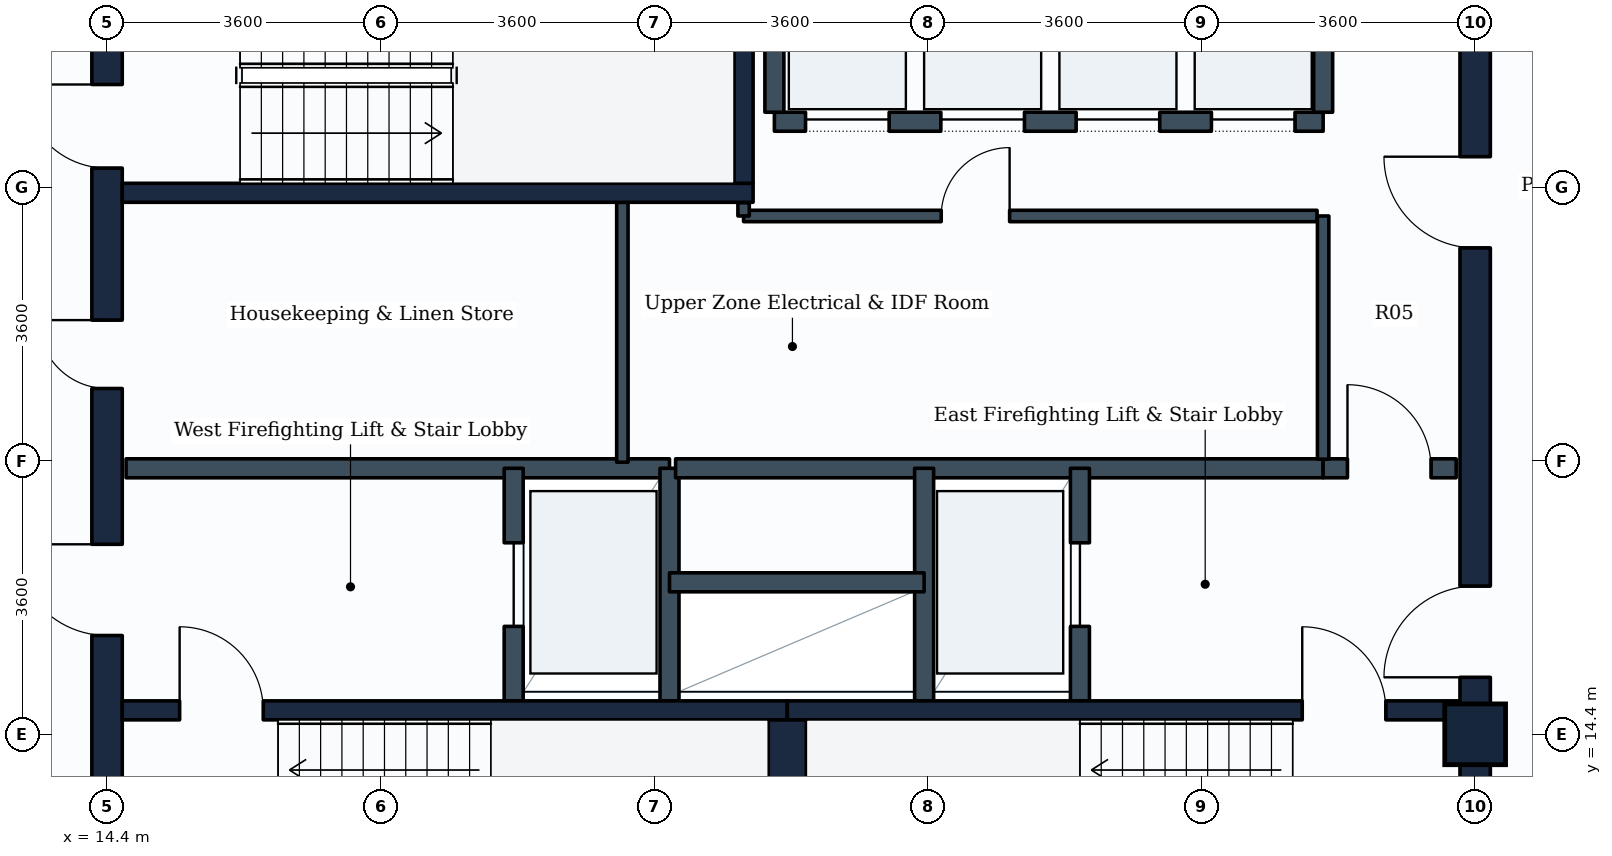
"""IFC4 building model, lengths in metres.
Left out: names, types, materials, properties, quantities, classifications, styles, units other than length and angle.
Written with IfcOpenShell. Run it as: python <this file> out.ifc"""

import sys

from ifc_helpers import new_model, si_unit, direction, frame, frame_2d, origin, origin_2d, place, context, subcontext, project, spatial, rectangle, extrude, element, fill, save


model = new_model("IFC4")
c1 = context("Model", 3, precision=1e-05, world=origin(), true_north=direction((0.0, 1.0)))
c2 = subcontext(c1, "Body", "Model", "MODEL_VIEW")
j1 = project(units=[si_unit("LENGTHUNIT", "METRE"), si_unit("PLANEANGLEUNIT", "RADIAN")], contexts=[c1])
p1 = place(None, origin())
s1 = spatial("IfcSite", under=j1, at=p1, CompositionType="ELEMENT")
p2 = place(p1, origin())
s2 = spatial("IfcBuilding", under=s1, at=p2, CompositionType="ELEMENT")
p3 = place(p2, frame((0.0, 0.0, 263.0)))
s3 = spatial("IfcBuildingStorey", under=s2, at=p3, CompositionType="ELEMENT", Elevation=263.0)
p4 = place(p3, frame((32.4, 14.4, 0.0), z_axis=(0.0, 0.0, 1.0), x_axis=(1.0, 0.0, 0.0)))
e1 = element("IfcColumn", 1, at=p4, inside=s3, PredefinedType="COLUMN", context=c2, shape_type="SweptSolid", body=[
    extrude(rectangle(XDim=0.8, YDim=0.8, at=origin_2d()), origin(), (0.0, 0.0, 1.0), 3.6),
])
p5 = place(p3, frame((14.4, 10.8, 0.0), z_axis=(0.0, 0.0, 1.0), x_axis=(0.0, 1.0, 0.0)))
e2 = element("IfcWall", 2, at=p5, inside=s3, PredefinedType="SHEAR", context=c2, shape_type="SweptSolid", body=[
    extrude(rectangle(XDim=14.4, YDim=0.4, at=frame_2d((7.2, 0.0))), origin(), (0.0, 0.0, 1.0), 3.35),
])
p6 = place(p5, frame((11.05, 0.0, 0.0)))
e3 = element("IfcOpeningElement", 3, at=p6, cuts=e2, PredefinedType="OPENING", context=c2, shape_type="SweptSolid", body=[
    extrude(rectangle(XDim=1.1, YDim=2.1, at=frame_2d((0.55, 1.05))), frame((0.0, 0.21, 0.0), z_axis=(0.0, -1.0, 0.0), x_axis=(1.0, 0.0, 0.0)), (0.0, 0.0, 1.0), 0.42),
])
p7 = place(p5, frame((4.9, 0.0, 0.0)))
e4 = element("IfcOpeningElement", 4, at=p7, cuts=e2, PredefinedType="OPENING", context=c2, shape_type="SweptSolid", body=[
    extrude(rectangle(XDim=1.2, YDim=2.1, at=frame_2d((0.6, 1.05))), frame((0.0, 0.21, 0.0), z_axis=(0.0, -1.0, 0.0), x_axis=(1.0, 0.0, 0.0)), (0.0, 0.0, 1.0), 0.42),
])
p8 = place(p5, frame((8.15, 0.0, 0.0)))
e5 = element("IfcOpeningElement", 5, at=p8, cuts=e2, PredefinedType="OPENING", context=c2, shape_type="SweptSolid", body=[
    extrude(rectangle(XDim=0.9, YDim=2.1, at=frame_2d((0.45, 1.05))), frame((0.0, 0.21, 0.0), z_axis=(0.0, -1.0, 0.0), x_axis=(1.0, 0.0, 0.0)), (0.0, 0.0, 1.0), 0.42),
])
p9 = place(p3, frame((32.4, 10.8, 0.0), z_axis=(0.0, 0.0, 1.0), x_axis=(0.0, 1.0, 0.0)))
e6 = element("IfcWall", 6, at=p9, inside=s3, PredefinedType="SHEAR", context=c2, shape_type="SweptSolid", body=[
    extrude(rectangle(XDim=14.4, YDim=0.4, at=frame_2d((7.2, 0.0))), origin(), (0.0, 0.0, 1.0), 3.35),
])
p10 = place(p9, frame((4.35, 0.0, 0.0)))
e7 = element("IfcOpeningElement", 7, at=p10, cuts=e6, PredefinedType="OPENING", context=c2, shape_type="SweptSolid", body=[
    extrude(rectangle(XDim=1.2, YDim=2.1, at=frame_2d((0.6, 1.05))), frame((0.0, 0.21, 0.0), z_axis=(0.0, -1.0, 0.0), x_axis=(1.0, 0.0, 0.0)), (0.0, 0.0, 1.0), 0.42),
])
p11 = place(p9, frame((10.0, 0.0, 0.0)))
e8 = element("IfcOpeningElement", 8, at=p11, cuts=e6, PredefinedType="OPENING", context=c2, shape_type="SweptSolid", body=[
    extrude(rectangle(XDim=1.2, YDim=2.1, at=frame_2d((0.6, 1.05))), frame((0.0, 0.21, 0.0), z_axis=(0.0, -1.0, 0.0), x_axis=(1.0, 0.0, 0.0)), (0.0, 0.0, 1.0), 0.42),
])
p12 = place(p3, frame((14.6, 14.715, 0.0), z_axis=(0.0, 0.0, 1.0), x_axis=(1.0, 0.0, 0.0)))
e9 = element("IfcWall", 9, at=p12, inside=s3, PredefinedType="SHEAR", context=c2, shape_type="SweptSolid", body=[
    extrude(rectangle(XDim=8.75, YDim=0.25, at=frame_2d((4.375, 0.0))), origin(), (0.0, 0.0, 1.0), 3.35),
])
p13 = place(p12, frame((0.755, 0.0, 0.0)))
e10 = element("IfcOpeningElement", 10, at=p13, cuts=e9, PredefinedType="OPENING", context=c2, shape_type="SweptSolid", body=[
    extrude(rectangle(XDim=1.1, YDim=2.1, at=frame_2d((0.55, 1.05))), frame((0.0, 0.135, 0.0), z_axis=(0.0, -1.0, 0.0), x_axis=(1.0, 0.0, 0.0)), (0.0, 0.0, 1.0), 0.27),
])
p14 = place(p3, frame((23.35, 14.715, 0.0), z_axis=(0.0, 0.0, 1.0), x_axis=(1.0, 0.0, 0.0)))
e11 = element("IfcWall", 11, at=p14, inside=s3, PredefinedType="SHEAR", context=c2, shape_type="SweptSolid", body=[
    extrude(rectangle(XDim=8.85, YDim=0.25, at=frame_2d((4.425, 0.0))), origin(), (0.0, 0.0, 1.0), 3.35),
])
p15 = place(p14, frame((6.775, 0.0, 0.0)))
e12 = element("IfcOpeningElement", 12, at=p15, cuts=e11, PredefinedType="OPENING", context=c2, shape_type="SweptSolid", body=[
    extrude(rectangle(XDim=1.1, YDim=2.1, at=frame_2d((0.55, 1.05))), frame((0.0, 0.135, 0.0), z_axis=(0.0, -1.0, 0.0), x_axis=(1.0, 0.0, 0.0)), (0.0, 0.0, 1.0), 0.27),
])
p16 = place(p3, frame((23.35, 11.75, 0.0), z_axis=(0.0, 0.0, 1.0), x_axis=(0.0, 1.0, 0.0)))
e13 = element("IfcWall", 13, at=p16, inside=s3, PredefinedType="SHEAR", context=c2, shape_type="SweptSolid", body=[
    extrude(rectangle(XDim=2.84, YDim=0.5, at=frame_2d((1.42, 0.0))), origin(), (0.0, 0.0, 1.0), 3.35),
])
p17 = place(p3, frame((14.6, 21.525, 0.0), z_axis=(0.0, 0.0, 1.0), x_axis=(1.0, 0.0, 0.0)))
e14 = element("IfcWall", 14, at=p17, inside=s3, PredefinedType="SHEAR", context=c2, shape_type="SweptSolid", body=[
    extrude(rectangle(XDim=8.3, YDim=0.25, at=frame_2d((4.15, 0.0))), origin(), (0.0, 0.0, 1.0), 3.35),
])
p18 = place(p3, frame((22.775, 21.65, 0.0), z_axis=(0.0, 0.0, 1.0), x_axis=(0.0, 1.0, 0.0)))
e15 = element("IfcWall", 15, at=p18, inside=s3, PredefinedType="SHEAR", context=c2, shape_type="SweptSolid", body=[
    extrude(rectangle(XDim=2.84, YDim=0.25, at=frame_2d((1.42, 0.0))), origin(), (0.0, 0.0, 1.0), 3.35),
])
p19 = place(p3, frame((14.65, 17.9, 0.0), z_axis=(0.0, 0.0, 1.0), x_axis=(1.0, 0.0, 0.0)))
e16 = element("IfcWall", 16, at=p19, inside=s3, PredefinedType="PARTITIONING", context=c2, shape_type="SweptSolid", body=[
    extrude(rectangle(XDim=7.15, YDim=0.25, at=frame_2d((3.575, 0.0))), origin(), (0.0, 0.0, 1.0), 3.335),
])
p20 = place(p3, frame((19.75, 14.84, 0.0), z_axis=(0.0, 0.0, 1.0), x_axis=(0.0, 1.0, 0.0)))
e17 = element("IfcWall", 17, at=p20, inside=s3, PredefinedType="PARTITIONING", context=c2, shape_type="SweptSolid", body=[
    extrude(rectangle(XDim=3.06, YDim=0.25, at=frame_2d((1.53, 0.0))), origin(), (0.0, 0.0, 1.0), 3.335),
])
p21 = place(p20, frame((0.98, 0.0, 0.0)))
e18 = element("IfcOpeningElement", 18, at=p21, cuts=e17, PredefinedType="OPENING", context=c2, shape_type="SweptSolid", body=[
    extrude(rectangle(XDim=1.1, YDim=2.1, at=frame_2d((0.55, 1.05))), frame((0.0, 0.135, 0.0), z_axis=(0.0, -1.0, 0.0), x_axis=(1.0, 0.0, 0.0)), (0.0, 0.0, 1.0), 0.27),
])
p22 = place(p3, frame((21.8, 14.84, 0.0), z_axis=(0.0, 0.0, 1.0), x_axis=(0.0, 1.0, 0.0)))
e19 = element("IfcWall", 19, at=p22, inside=s3, PredefinedType="PARTITIONING", context=c2, shape_type="SweptSolid", body=[
    extrude(rectangle(XDim=3.06, YDim=0.25, at=frame_2d((1.53, 0.0))), origin(), (0.0, 0.0, 1.0), 3.335),
])
p23 = place(p3, frame((21.88, 17.9, 0.0), z_axis=(0.0, 0.0, 1.0), x_axis=(1.0, 0.0, 0.0)))
e20 = element("IfcWall", 20, at=p23, inside=s3, PredefinedType="PARTITIONING", context=c2, shape_type="SweptSolid", body=[
    extrude(rectangle(XDim=8.52, YDim=0.25, at=frame_2d((4.26, 0.0))), origin(), (0.0, 0.0, 1.0), 3.335),
])
p24 = place(p3, frame((30.4, 17.9, 0.0), z_axis=(0.0, 0.0, 1.0), x_axis=(1.0, 0.0, 0.0)))
e21 = element("IfcWall", 21, at=p24, inside=s3, PredefinedType="PARTITIONING", context=c2, shape_type="SweptSolid", body=[
    extrude(rectangle(XDim=1.75, YDim=0.25, at=frame_2d((0.875, 0.0))), origin(), (0.0, 0.0, 1.0), 3.335),
])
p25 = place(p24, frame((0.32, 0.0, 0.0)))
e22 = element("IfcOpeningElement", 22, at=p25, cuts=e21, PredefinedType="OPENING", context=c2, shape_type="SweptSolid", body=[
    extrude(rectangle(XDim=1.1, YDim=2.1, at=frame_2d((0.55, 1.05))), frame((0.0, 0.135, 0.0), z_axis=(0.0, -1.0, 0.0), x_axis=(1.0, 0.0, 0.0)), (0.0, 0.0, 1.0), 0.27),
])
p26 = place(p3, frame((25.15, 14.84, 0.0), z_axis=(0.0, 0.0, 1.0), x_axis=(0.0, 1.0, 0.0)))
e23 = element("IfcWall", 23, at=p26, inside=s3, PredefinedType="PARTITIONING", context=c2, shape_type="SweptSolid", body=[
    extrude(rectangle(XDim=3.06, YDim=0.25, at=frame_2d((1.53, 0.0))), origin(), (0.0, 0.0, 1.0), 3.335),
])
p27 = place(p3, frame((27.2, 14.84, 0.0), z_axis=(0.0, 0.0, 1.0), x_axis=(0.0, 1.0, 0.0)))
e24 = element("IfcWall", 24, at=p27, inside=s3, PredefinedType="PARTITIONING", context=c2, shape_type="SweptSolid", body=[
    extrude(rectangle(XDim=3.06, YDim=0.25, at=frame_2d((1.53, 0.0))), origin(), (0.0, 0.0, 1.0), 3.335),
])
p28 = place(p27, frame((0.98, 0.0, 0.0)))
e25 = element("IfcOpeningElement", 25, at=p28, cuts=e24, PredefinedType="OPENING", context=c2, shape_type="SweptSolid", body=[
    extrude(rectangle(XDim=1.1, YDim=2.1, at=frame_2d((0.55, 1.05))), frame((0.0, 0.135, 0.0), z_axis=(0.0, -1.0, 0.0), x_axis=(1.0, 0.0, 0.0)), (0.0, 0.0, 1.0), 0.27),
])
p29 = place(p3, frame((21.8, 16.4, 0.0), z_axis=(0.0, 0.0, 1.0), x_axis=(1.0, 0.0, 0.0)))
e26 = element("IfcWall", 26, at=p29, inside=s3, PredefinedType="PARTITIONING", context=c2, shape_type="SweptSolid", body=[
    extrude(rectangle(XDim=3.35, YDim=0.25, at=frame_2d((1.675, 0.0))), origin(), (0.0, 0.0, 1.0), 3.335),
])
p30 = place(p3, frame((23.18, 22.46, 0.0), z_axis=(0.0, 0.0, 1.0), x_axis=(1.0, 0.0, 0.0)))
e27 = element("IfcWall", 27, at=p30, inside=s3, PredefinedType="PARTITIONING", context=c2, shape_type="SweptSolid", body=[
    extrude(rectangle(XDim=7.22, YDim=0.25, at=frame_2d((3.61, 0.0))), origin(), (0.0, 0.0, 1.0), 3.335),
])
p31 = place(p30, frame((0.41, 0.0, 0.0)))
e28 = element("IfcOpeningElement", 28, at=p31, cuts=e27, PredefinedType="OPENING", context=c2, shape_type="SweptSolid", body=[
    extrude(rectangle(XDim=1.1, YDim=2.1, at=frame_2d((0.55, 1.05))), frame((0.0, 0.135, 0.0), z_axis=(0.0, -1.0, 0.0), x_axis=(1.0, 0.0, 0.0)), (0.0, 0.0, 1.0), 0.27),
])
p32 = place(p30, frame((2.19, 0.0, 0.0)))
e29 = element("IfcOpeningElement", 29, at=p32, cuts=e27, PredefinedType="OPENING", context=c2, shape_type="SweptSolid", body=[
    extrude(rectangle(XDim=1.1, YDim=2.1, at=frame_2d((0.55, 1.05))), frame((0.0, 0.135, 0.0), z_axis=(0.0, -1.0, 0.0), x_axis=(1.0, 0.0, 0.0)), (0.0, 0.0, 1.0), 0.27),
])
p33 = place(p30, frame((3.97, 0.0, 0.0)))
e30 = element("IfcOpeningElement", 30, at=p33, cuts=e27, PredefinedType="OPENING", context=c2, shape_type="SweptSolid", body=[
    extrude(rectangle(XDim=1.1, YDim=2.1, at=frame_2d((0.55, 1.05))), frame((0.0, 0.135, 0.0), z_axis=(0.0, -1.0, 0.0), x_axis=(1.0, 0.0, 0.0)), (0.0, 0.0, 1.0), 0.27),
])
p34 = place(p30, frame((5.75, 0.0, 0.0)))
e31 = element("IfcOpeningElement", 31, at=p34, cuts=e27, PredefinedType="OPENING", context=c2, shape_type="SweptSolid", body=[
    extrude(rectangle(XDim=1.1, YDim=2.1, at=frame_2d((0.55, 1.05))), frame((0.0, 0.135, 0.0), z_axis=(0.0, -1.0, 0.0), x_axis=(1.0, 0.0, 0.0)), (0.0, 0.0, 1.0), 0.27),
])
for number, where, z_axis, x_axis in (
    (32, (23.18, 22.585, 0.0), (0.0, 0.0, 1.0), (0.0, 1.0, 0.0)),
    (33, (30.4, 22.585, 0.0), (0.0, 0.0, 1.0), (0.0, 1.0, 0.0)),
):
    element("IfcWall", number, at=place(p3, frame(where, z_axis=z_axis, x_axis=x_axis)), inside=s3, PredefinedType="PARTITIONING", context=c2, shape_type="SweptSolid", body=[
        extrude(rectangle(XDim=2.315, YDim=0.25, at=frame_2d((1.157, 0.0))), origin(), (0.0, 0.0, 1.0), 3.335),
    ])
p35 = place(p3, frame((22.775, 21.22, 0.0), z_axis=(0.0, 0.0, 1.0), x_axis=(1.0, 0.0, 0.0)))
e34 = element("IfcWall", 34, at=p35, inside=s3, PredefinedType="PARTITIONING", context=c2, shape_type="SweptSolid", body=[
    extrude(rectangle(XDim=7.545, YDim=0.15, at=frame_2d((3.772, 0.0))), origin(), (0.0, 0.0, 1.0), 3.335),
])
p36 = place(p35, frame((2.6, 0.0, 0.0)))
e35 = element("IfcOpeningElement", 35, at=p36, cuts=e34, PredefinedType="OPENING", context=c2, shape_type="SweptSolid", body=[
    extrude(rectangle(XDim=0.9, YDim=2.1, at=frame_2d((0.45, 1.05))), frame((0.0, 0.085, 0.0), z_axis=(0.0, -1.0, 0.0), x_axis=(1.0, 0.0, 0.0)), (0.0, 0.0, 1.0), 0.17),
])
p37 = place(p3, frame((22.775, 21.22, 0.0), z_axis=(0.0, 0.0, 1.0), x_axis=(0.0, 1.0, 0.0)))
e36 = element("IfcWall", 36, at=p37, inside=s3, PredefinedType="PARTITIONING", context=c2, shape_type="SweptSolid", body=[
    extrude(rectangle(XDim=0.175, YDim=0.15, at=frame_2d((0.087, 0.0))), origin(), (0.0, 0.0, 1.0), 3.335),
])
p38 = place(p3, frame((30.4, 18.02, 0.0), z_axis=(0.0, 0.0, 1.0), x_axis=(0.0, 1.0, 0.0)))
e37 = element("IfcWall", 37, at=p38, inside=s3, PredefinedType="PARTITIONING", context=c2, shape_type="SweptSolid", body=[
    extrude(rectangle(XDim=3.2, YDim=0.15, at=frame_2d((1.6, 0.0))), origin(), (0.0, 0.0, 1.0), 3.335),
])
p39 = place(p3, frame((21.18, 17.98, 0.0), z_axis=(0.0, 0.0, 1.0), x_axis=(0.0, 1.0, 0.0)))
e38 = element("IfcWall", 38, at=p39, inside=s3, PredefinedType="PARTITIONING", context=c2, shape_type="SweptSolid", body=[
    extrude(rectangle(XDim=3.42, YDim=0.15, at=frame_2d((1.71, 0.0))), origin(), (0.0, 0.0, 1.0), 3.335),
])
p40 = place(p13, origin())
e39 = element("IfcDoor", 39, at=p40, inside=s3, OperationType="SINGLE_SWING_LEFT", PredefinedType="DOOR", context=c2, shape_type="SweptSolid", body=[
    extrude(rectangle(XDim=1.1, YDim=2.1, at=frame_2d((0.55, 1.05))), frame((0.0, 0.025, 0.0), z_axis=(0.0, -1.0, 0.0), x_axis=(1.0, 0.0, 0.0)), (0.0, 0.0, 1.0), 0.05),
])
fill(e10, e39)
p41 = place(p15, origin())
e40 = element("IfcDoor", 40, at=p41, inside=s3, OperationType="SINGLE_SWING_LEFT", PredefinedType="DOOR", context=c2, shape_type="SweptSolid", body=[
    extrude(rectangle(XDim=1.1, YDim=2.1, at=frame_2d((0.55, 1.05))), frame((0.0, 0.025, 0.0), z_axis=(0.0, -1.0, 0.0), x_axis=(1.0, 0.0, 0.0)), (0.0, 0.0, 1.0), 0.05),
])
fill(e12, e40)
p42 = place(p6, origin())
e41 = element("IfcDoor", 41, at=p42, inside=s3, OperationType="SINGLE_SWING_RIGHT", PredefinedType="DOOR", context=c2, shape_type="SweptSolid", body=[
    extrude(rectangle(XDim=1.1, YDim=2.1, at=frame_2d((0.55, 1.05))), frame((0.0, 0.025, 0.0), z_axis=(0.0, -1.0, 0.0), x_axis=(1.0, 0.0, 0.0)), (0.0, 0.0, 1.0), 0.05),
])
fill(e3, e41)
p43 = place(p21, origin())
e42 = element("IfcDoor", 42, at=p43, inside=s3, OperationType="SLIDING_TO_LEFT", PredefinedType="DOOR", context=c2, shape_type="SweptSolid", body=[
    extrude(rectangle(XDim=1.1, YDim=2.1, at=frame_2d((0.55, 1.05))), frame((0.0, 0.025, 0.0), z_axis=(0.0, -1.0, 0.0), x_axis=(1.0, 0.0, 0.0)), (0.0, 0.0, 1.0), 0.05),
])
fill(e18, e42)
p44 = place(p28, origin())
e43 = element("IfcDoor", 43, at=p44, inside=s3, OperationType="SLIDING_TO_LEFT", PredefinedType="DOOR", context=c2, shape_type="SweptSolid", body=[
    extrude(rectangle(XDim=1.1, YDim=2.1, at=frame_2d((0.55, 1.05))), frame((0.0, 0.025, 0.0), z_axis=(0.0, -1.0, 0.0), x_axis=(1.0, 0.0, 0.0)), (0.0, 0.0, 1.0), 0.05),
])
fill(e25, e43)
p45 = place(p7, origin())
e44 = element("IfcDoor", 44, at=p45, inside=s3, OperationType="SINGLE_SWING_RIGHT", PredefinedType="DOOR", context=c2, shape_type="SweptSolid", body=[
    extrude(rectangle(XDim=1.2, YDim=2.1, at=frame_2d((0.6, 1.05))), frame((0.0, 0.025, 0.0), z_axis=(0.0, -1.0, 0.0), x_axis=(1.0, 0.0, 0.0)), (0.0, 0.0, 1.0), 0.05),
])
fill(e4, e44)
p46 = place(p10, origin())
e45 = element("IfcDoor", 45, at=p46, inside=s3, OperationType="SINGLE_SWING_LEFT", PredefinedType="DOOR", context=c2, shape_type="SweptSolid", body=[
    extrude(rectangle(XDim=1.2, YDim=2.1, at=frame_2d((0.6, 1.05))), frame((0.0, 0.025, 0.0), z_axis=(0.0, -1.0, 0.0), x_axis=(1.0, 0.0, 0.0)), (0.0, 0.0, 1.0), 0.05),
])
fill(e7, e45)
p47 = place(p25, origin())
e46 = element("IfcDoor", 46, at=p47, inside=s3, OperationType="SINGLE_SWING_LEFT", PredefinedType="DOOR", context=c2, shape_type="SweptSolid", body=[
    extrude(rectangle(XDim=1.1, YDim=2.1, at=frame_2d((0.55, 1.05))), frame((0.0, 0.025, 0.0), z_axis=(0.0, -1.0, 0.0), x_axis=(1.0, 0.0, 0.0)), (0.0, 0.0, 1.0), 0.05),
])
fill(e22, e46)
p48 = place(p31, origin())
e47 = element("IfcDoor", 47, at=p48, inside=s3, OperationType="SLIDING_TO_LEFT", PredefinedType="DOOR", context=c2, shape_type="SweptSolid", body=[
    extrude(rectangle(XDim=1.1, YDim=2.1, at=frame_2d((0.55, 1.05))), frame((0.0, 0.025, 0.0), z_axis=(0.0, -1.0, 0.0), x_axis=(1.0, 0.0, 0.0)), (0.0, 0.0, 1.0), 0.05),
])
fill(e28, e47)
p49 = place(p32, origin())
e48 = element("IfcDoor", 48, at=p49, inside=s3, OperationType="SLIDING_TO_LEFT", PredefinedType="DOOR", context=c2, shape_type="SweptSolid", body=[
    extrude(rectangle(XDim=1.1, YDim=2.1, at=frame_2d((0.55, 1.05))), frame((0.0, 0.025, 0.0), z_axis=(0.0, -1.0, 0.0), x_axis=(1.0, 0.0, 0.0)), (0.0, 0.0, 1.0), 0.05),
])
fill(e29, e48)
p50 = place(p33, origin())
e49 = element("IfcDoor", 49, at=p50, inside=s3, OperationType="SLIDING_TO_LEFT", PredefinedType="DOOR", context=c2, shape_type="SweptSolid", body=[
    extrude(rectangle(XDim=1.1, YDim=2.1, at=frame_2d((0.55, 1.05))), frame((0.0, 0.025, 0.0), z_axis=(0.0, -1.0, 0.0), x_axis=(1.0, 0.0, 0.0)), (0.0, 0.0, 1.0), 0.05),
])
fill(e30, e49)
p51 = place(p34, origin())
e50 = element("IfcDoor", 50, at=p51, inside=s3, OperationType="SLIDING_TO_LEFT", PredefinedType="DOOR", context=c2, shape_type="SweptSolid", body=[
    extrude(rectangle(XDim=1.1, YDim=2.1, at=frame_2d((0.55, 1.05))), frame((0.0, 0.025, 0.0), z_axis=(0.0, -1.0, 0.0), x_axis=(1.0, 0.0, 0.0)), (0.0, 0.0, 1.0), 0.05),
])
fill(e31, e50)
p52 = place(p11, origin())
e51 = element("IfcDoor", 51, at=p52, inside=s3, OperationType="SINGLE_SWING_RIGHT", PredefinedType="DOOR", context=c2, shape_type="SweptSolid", body=[
    extrude(rectangle(XDim=1.2, YDim=2.1, at=frame_2d((0.6, 1.05))), frame((0.0, 0.025, 0.0), z_axis=(0.0, -1.0, 0.0), x_axis=(1.0, 0.0, 0.0)), (0.0, 0.0, 1.0), 0.05),
])
fill(e8, e51)
p53 = place(p8, origin())
e52 = element("IfcDoor", 52, at=p53, inside=s3, OperationType="SINGLE_SWING_RIGHT", PredefinedType="DOOR", context=c2, shape_type="SweptSolid", body=[
    extrude(rectangle(XDim=0.9, YDim=2.1, at=frame_2d((0.45, 1.05))), frame((0.0, 0.025, 0.0), z_axis=(0.0, -1.0, 0.0), x_axis=(1.0, 0.0, 0.0)), (0.0, 0.0, 1.0), 0.05),
])
fill(e5, e52)
p54 = place(p36, origin())
e53 = element("IfcDoor", 53, at=p54, inside=s3, OperationType="SINGLE_SWING_RIGHT", PredefinedType="DOOR", context=c2, shape_type="SweptSolid", body=[
    extrude(rectangle(XDim=0.9, YDim=2.1, at=frame_2d((0.45, 1.05))), frame((0.0, 0.025, 0.0), z_axis=(0.0, -1.0, 0.0), x_axis=(1.0, 0.0, 0.0)), (0.0, 0.0, 1.0), 0.05),
])
fill(e35, e53)
save(model, sys.argv[1])
